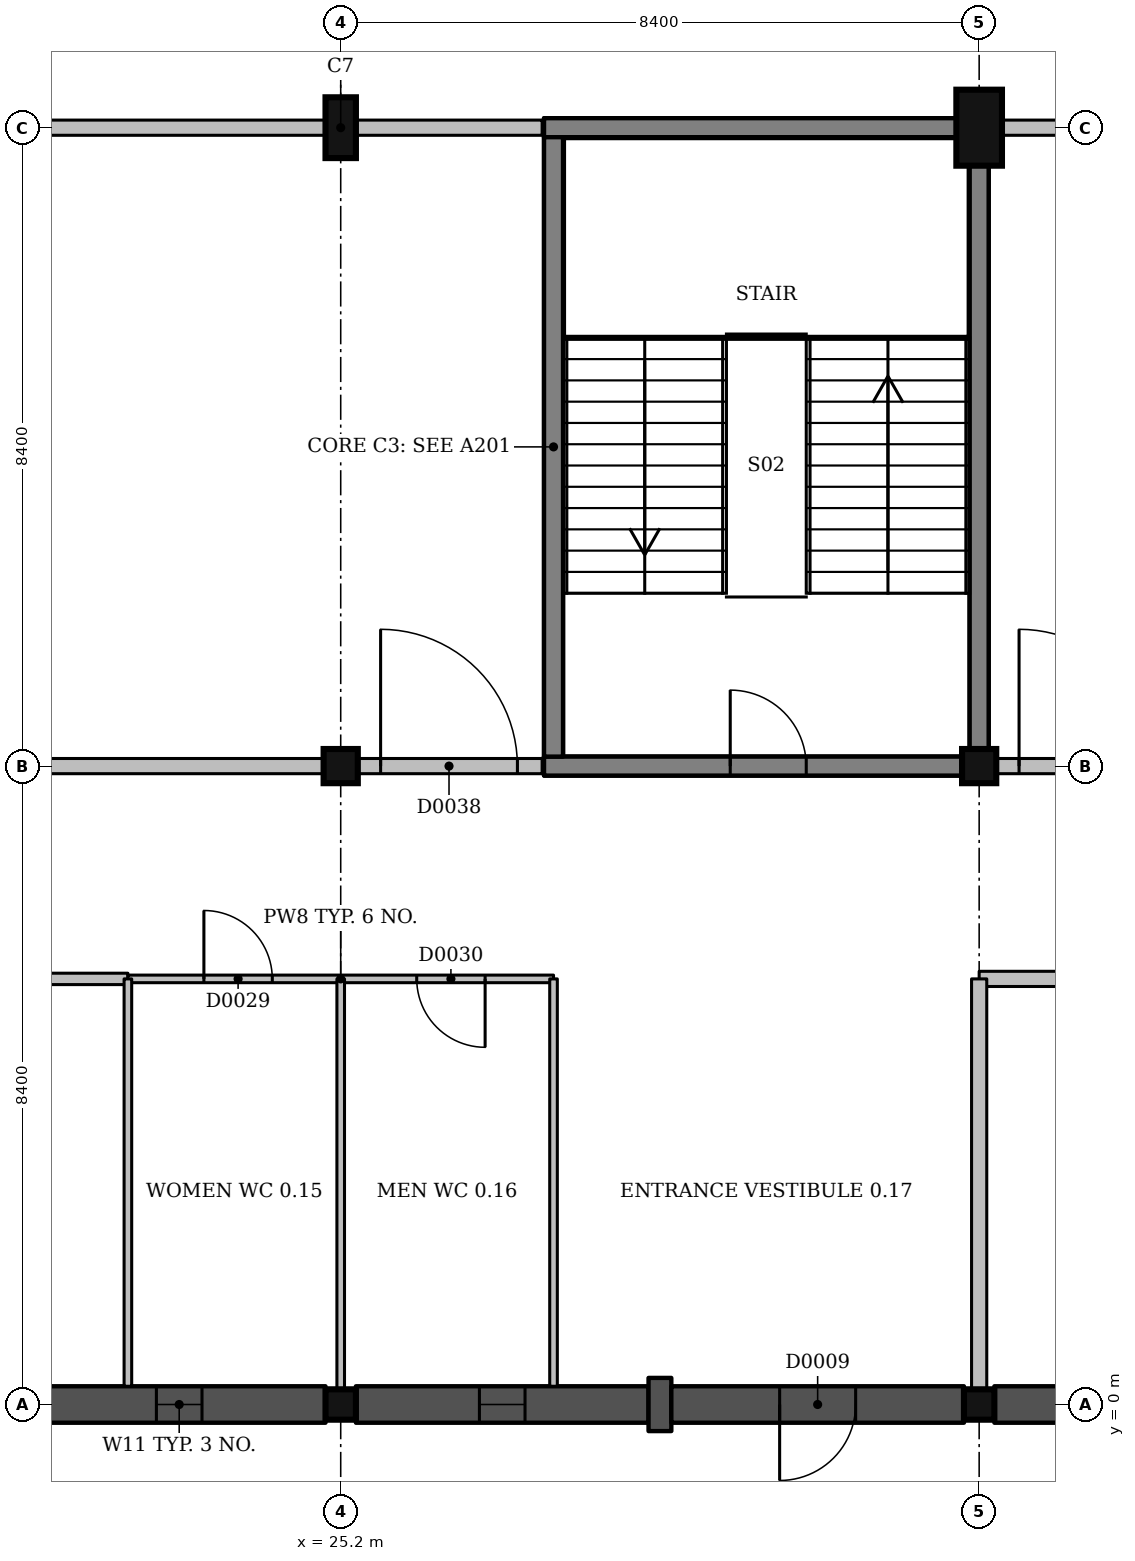
"""IFC4 building model, lengths in metres.
Left out: names, types, materials, properties, quantities, classifications, styles, units other than length and angle.
Written with IfcOpenShell. Run it as: python <this file> out.ifc"""

import sys

from ifc_helpers import new_model, si_unit, direction, frame, frame_2d, origin, origin_2d, place, context, subcontext, project, spatial, rectangle, extrude, element, fill, save


model = new_model("IFC4")
c1 = context("Model", 3, precision=1e-05, world=origin(), true_north=direction((0.0, 1.0)))
c2 = subcontext(c1, "Body", "Model", "MODEL_VIEW")
j1 = project(units=[si_unit("LENGTHUNIT", "METRE"), si_unit("PLANEANGLEUNIT", "RADIAN")], contexts=[c1])
p1 = place(None, origin())
s1 = spatial("IfcSite", under=j1, at=p1, CompositionType="ELEMENT")
p2 = place(p1, origin())
s2 = spatial("IfcBuilding", under=s1, at=p2, CompositionType="ELEMENT")
p3 = place(p2, origin())
s3 = spatial("IfcBuildingStorey", under=s2, at=p3, CompositionType="ELEMENT", Elevation=0.0)
p4 = place(p3, frame((25.2, 0.0, -1.5), z_axis=(0.0, 0.0, 1.0), x_axis=(1.0, 0.0, 0.0)))
e1 = element("IfcColumn", 1, at=p4, inside=s3, PredefinedType="COLUMN", context=c2, shape_type="SweptSolid", body=[
    extrude(rectangle(XDim=0.4, YDim=0.4, at=origin_2d()), origin(), (0.0, 0.0, 1.0), 6.0),
])
p5 = place(p3, frame((25.2, 8.4, -1.5), z_axis=(0.0, 0.0, 1.0), x_axis=(1.0, 0.0, 0.0)))
e2 = element("IfcColumn", 2, at=p5, inside=s3, PredefinedType="COLUMN", context=c2, shape_type="SweptSolid", body=[
    extrude(rectangle(XDim=0.45, YDim=0.45, at=origin_2d()), origin(), (0.0, 0.0, 1.0), 6.0),
])
p6 = place(p3, frame((25.2, 16.8, -1.5), z_axis=(0.0, 0.0, 1.0), x_axis=(1.0, 0.0, 0.0)))
e3 = element("IfcColumn", 3, at=p6, inside=s3, PredefinedType="COLUMN", context=c2, shape_type="SweptSolid", body=[
    extrude(rectangle(XDim=0.4, YDim=0.8, at=origin_2d()), origin(), (0.0, 0.0, 1.0), 6.0),
])
p7 = place(p3, frame((33.6, 0.0, -1.5), z_axis=(0.0, 0.0, 1.0), x_axis=(1.0, 0.0, 0.0)))
e4 = element("IfcColumn", 4, at=p7, inside=s3, PredefinedType="COLUMN", context=c2, shape_type="SweptSolid", body=[
    extrude(rectangle(XDim=0.4, YDim=0.4, at=origin_2d()), origin(), (0.0, 0.0, 1.0), 6.0),
])
p8 = place(p3, frame((33.6, 8.4, -1.5), z_axis=(0.0, 0.0, 1.0), x_axis=(1.0, 0.0, 0.0)))
e5 = element("IfcColumn", 5, at=p8, inside=s3, PredefinedType="COLUMN", context=c2, shape_type="SweptSolid", body=[
    extrude(rectangle(XDim=0.45, YDim=0.45, at=origin_2d()), origin(), (0.0, 0.0, 1.0), 6.0),
])
p9 = place(p3, frame((33.6, 16.8, -1.5), z_axis=(0.0, 0.0, 1.0), x_axis=(1.0, 0.0, 0.0)))
e6 = element("IfcColumn", 6, at=p9, inside=s3, PredefinedType="COLUMN", context=c2, shape_type="SweptSolid", body=[
    extrude(rectangle(XDim=0.6, YDim=1.0, at=origin_2d()), origin(), (0.0, 0.0, 1.0), 6.0),
])
p10 = place(p3, frame((27.875, 8.4, 0.0), z_axis=(0.0, 0.0, 1.0), x_axis=(1.0, 0.0, 0.0)))
e7 = element("IfcWall", 7, at=p10, inside=s3, PredefinedType="SHEAR", context=c2, shape_type="SweptSolid", body=[
    extrude(rectangle(XDim=5.5, YDim=0.25, at=frame_2d((2.75, 0.0))), origin(), (0.0, 0.0, 1.0), 4.5),
])
p11 = place(p10, frame((2.45, 0.0, 0.0)))
e8 = element("IfcOpeningElement", 8, at=p11, cuts=e7, PredefinedType="OPENING", context=c2, shape_type="SweptSolid", body=[
    extrude(rectangle(XDim=1.0, YDim=2.1, at=frame_2d((0.5, 1.05))), frame((0.0, 0.135, 0.0), z_axis=(0.0, -1.0, 0.0), x_axis=(1.0, 0.0, 0.0)), (0.0, 0.0, 1.0), 0.27),
])
p12 = place(p3, frame((27.875, 16.8, 0.0), z_axis=(0.0, 0.0, 1.0), x_axis=(1.0, 0.0, 0.0)))
e9 = element("IfcWall", 9, at=p12, inside=s3, PredefinedType="SHEAR", context=c2, shape_type="SweptSolid", body=[
    extrude(rectangle(XDim=5.425, YDim=0.25, at=frame_2d((2.712, 0.0))), origin(), (0.0, 0.0, 1.0), 4.5),
])
p13 = place(p3, frame((28.0, 8.525, 0.0), z_axis=(0.0, 0.0, 1.0), x_axis=(0.0, 1.0, 0.0)))
e10 = element("IfcWall", 10, at=p13, inside=s3, PredefinedType="SHEAR", context=c2, shape_type="SweptSolid", body=[
    extrude(rectangle(XDim=8.15, YDim=0.25, at=frame_2d((4.075, 0.0))), origin(), (0.0, 0.0, 1.0), 4.5),
])
p14 = place(p3, frame((33.6, 8.625, 0.0), z_axis=(0.0, 0.0, 1.0), x_axis=(0.0, 1.0, 0.0)))
e11 = element("IfcWall", 11, at=p14, inside=s3, PredefinedType="SHEAR", context=c2, shape_type="SweptSolid", body=[
    extrude(rectangle(XDim=7.675, YDim=0.25, at=frame_2d((3.837, 0.0))), origin(), (0.0, 0.0, 1.0), 4.5),
])
for number, where, z_axis, x_axis in (
    (12, (27.875, 8.4, -1.5), (0.0, 0.0, 1.0), (1.0, 0.0, 0.0)),
    (13, (27.875, 16.8, -1.5), (0.0, 0.0, 1.0), (1.0, 0.0, 0.0)),
):
    element("IfcWall", number, at=place(p3, frame(where, z_axis=z_axis, x_axis=x_axis)), inside=s3, PredefinedType="SHEAR", context=c2, shape_type="SweptSolid", body=[
        extrude(rectangle(XDim=5.85, YDim=0.25, at=frame_2d((2.925, 0.0))), origin(), (0.0, 0.0, 1.0), 1.5),
    ])
for number, where, z_axis, x_axis in (
    (14, (28.0, 8.525, -1.5), (0.0, 0.0, 1.0), (0.0, 1.0, 0.0)),
    (15, (33.6, 8.525, -1.5), (0.0, 0.0, 1.0), (0.0, 1.0, 0.0)),
):
    element("IfcWall", number, at=place(p3, frame(where, z_axis=z_axis, x_axis=x_axis)), inside=s3, PredefinedType="SHEAR", context=c2, shape_type="SweptSolid", body=[
        extrude(rectangle(XDim=8.15, YDim=0.25, at=frame_2d((4.075, 0.0))), origin(), (0.0, 0.0, 1.0), 1.5),
    ])
p15 = place(p3, frame((21.15, 0.0, 0.0), z_axis=(0.0, 0.0, 1.0), x_axis=(1.0, 0.0, 0.0)))
e16 = element("IfcWall", 16, at=p15, inside=s3, PredefinedType="SOLIDWALL", context=c2, shape_type="SweptSolid", body=[
    extrude(rectangle(XDim=3.85, YDim=0.48, at=frame_2d((1.925, 0.0))), origin(), (0.0, 0.0, 1.0), 3.45),
])
p16 = place(p15, frame((1.625, 0.0, 1.5)))
e17 = element("IfcOpeningElement", 17, at=p16, cuts=e16, PredefinedType="OPENING", context=c2, shape_type="SweptSolid", body=[
    extrude(rectangle(XDim=0.6, YDim=1.2, at=frame_2d((0.3, 0.6))), frame((0.0, 0.25, 0.0), z_axis=(0.0, -1.0, 0.0), x_axis=(1.0, 0.0, 0.0)), (0.0, 0.0, 1.0), 0.5),
])
p17 = place(p3, frame((25.4, 0.0, 0.0), z_axis=(0.0, 0.0, 1.0), x_axis=(1.0, 0.0, 0.0)))
e18 = element("IfcWall", 18, at=p17, inside=s3, PredefinedType="SOLIDWALL", context=c2, shape_type="SweptSolid", body=[
    extrude(rectangle(XDim=3.85, YDim=0.48, at=frame_2d((1.925, 0.0))), origin(), (0.0, 0.0, 1.0), 3.45),
])
p18 = place(p17, frame((1.625, 0.0, 1.5)))
e19 = element("IfcOpeningElement", 19, at=p18, cuts=e18, PredefinedType="OPENING", context=c2, shape_type="SweptSolid", body=[
    extrude(rectangle(XDim=0.6, YDim=1.2, at=frame_2d((0.3, 0.6))), frame((0.0, 0.25, 0.0), z_axis=(0.0, -1.0, 0.0), x_axis=(1.0, 0.0, 0.0)), (0.0, 0.0, 1.0), 0.5),
])
p19 = place(p3, frame((29.25, 0.0, 0.0), z_axis=(0.0, 0.0, 1.0), x_axis=(1.0, 0.0, 0.0)))
e20 = element("IfcWall", 20, at=p19, inside=s3, PredefinedType="SOLIDWALL", context=c2, shape_type="SweptSolid", body=[
    extrude(rectangle(XDim=0.3, YDim=0.7, at=frame_2d((0.15, 0.0))), origin(), (0.0, 0.0, 1.0), 3.45),
])
p20 = place(p3, frame((29.55, 0.0, 0.0), z_axis=(0.0, 0.0, 1.0), x_axis=(1.0, 0.0, 0.0)))
e21 = element("IfcWall", 21, at=p20, inside=s3, PredefinedType="SOLIDWALL", context=c2, shape_type="SweptSolid", body=[
    extrude(rectangle(XDim=3.85, YDim=0.48, at=frame_2d((1.925, 0.0))), origin(), (0.0, 0.0, 1.0), 3.45),
])
p21 = place(p20, frame((1.425, 0.0, 0.0)))
e22 = element("IfcOpeningElement", 22, at=p21, cuts=e21, PredefinedType="OPENING", context=c2, shape_type="SweptSolid", body=[
    extrude(rectangle(XDim=1.0, YDim=2.1, at=frame_2d((0.5, 1.05))), frame((0.0, 0.25, 0.0), z_axis=(0.0, -1.0, 0.0), x_axis=(1.0, 0.0, 0.0)), (0.0, 0.0, 1.0), 0.5),
])
p22 = place(p3, frame((33.8, 0.0, 0.0), z_axis=(0.0, 0.0, 1.0), x_axis=(1.0, 0.0, 0.0)))
e23 = element("IfcWall", 23, at=p22, inside=s3, PredefinedType="SOLIDWALL", context=c2, shape_type="SweptSolid", body=[
    extrude(rectangle(XDim=3.85, YDim=0.48, at=frame_2d((1.925, 0.0))), origin(), (0.0, 0.0, 1.0), 3.45),
])
p23 = place(p22, frame((1.175, 0.0, 0.0)))
e24 = element("IfcOpeningElement", 24, at=p23, cuts=e23, PredefinedType="OPENING", context=c2, shape_type="SweptSolid", body=[
    extrude(rectangle(XDim=1.5, YDim=2.1, at=frame_2d((0.75, 1.05))), frame((0.0, 0.25, 0.0), z_axis=(0.0, -1.0, 0.0), x_axis=(1.0, 0.0, 0.0)), (0.0, 0.0, 1.0), 0.5),
])
p24 = place(p3, frame((5.6, 5.6, 0.0), z_axis=(0.0, 0.0, 1.0), x_axis=(1.0, 0.0, 0.0)))
e25 = element("IfcWall", 25, at=p24, inside=s3, PredefinedType="PARTITIONING", context=c2, shape_type="SweptSolid", body=[
    extrude(rectangle(XDim=16.8, YDim=0.15, at=frame_2d((8.4, 0.0))), origin(), (0.0, 0.0, 1.0), 3.5),
])
p25 = place(p24, frame((3.8, 0.0, 0.0)))
e26 = element("IfcOpeningElement", 26, at=p25, cuts=e25, PredefinedType="OPENING", context=c2, shape_type="SweptSolid", body=[
    extrude(rectangle(XDim=0.9, YDim=2.1, at=frame_2d((0.45, 1.05))), frame((0.0, 0.085, 0.0), z_axis=(0.0, -1.0, 0.0), x_axis=(1.0, 0.0, 0.0)), (0.0, 0.0, 1.0), 0.17),
])
p26 = place(p24, frame((12.2, 0.0, 0.0)))
e27 = element("IfcOpeningElement", 27, at=p26, cuts=e25, PredefinedType="OPENING", context=c2, shape_type="SweptSolid", body=[
    extrude(rectangle(XDim=0.9, YDim=2.1, at=frame_2d((0.45, 1.05))), frame((0.0, 0.085, 0.0), z_axis=(0.0, -1.0, 0.0), x_axis=(1.0, 0.0, 0.0)), (0.0, 0.0, 1.0), 0.17),
])
p27 = place(p3, frame((22.4, 5.6, 0.0), z_axis=(0.0, 0.0, 1.0), x_axis=(1.0, 0.0, 0.0)))
e28 = element("IfcWall", 28, at=p27, inside=s3, PredefinedType="PARTITIONING", context=c2, shape_type="SweptSolid", body=[
    extrude(rectangle(XDim=5.6, YDim=0.1, at=frame_2d((2.8, 0.0))), origin(), (0.0, 0.0, 1.0), 3.5),
])
p28 = place(p27, frame((1.0, 0.0, 0.0)))
e29 = element("IfcOpeningElement", 29, at=p28, cuts=e28, PredefinedType="OPENING", context=c2, shape_type="SweptSolid", body=[
    extrude(rectangle(XDim=0.9, YDim=2.1, at=frame_2d((0.45, 1.05))), frame((0.0, 0.06, 0.0), z_axis=(0.0, -1.0, 0.0), x_axis=(1.0, 0.0, 0.0)), (0.0, 0.0, 1.0), 0.12),
])
p29 = place(p27, frame((3.8, 0.0, 0.0)))
e30 = element("IfcOpeningElement", 30, at=p29, cuts=e28, PredefinedType="OPENING", context=c2, shape_type="SweptSolid", body=[
    extrude(rectangle(XDim=0.9, YDim=2.1, at=frame_2d((0.45, 1.05))), frame((0.0, 0.06, 0.0), z_axis=(0.0, -1.0, 0.0), x_axis=(1.0, 0.0, 0.0)), (0.0, 0.0, 1.0), 0.12),
])
p30 = place(p3, frame((33.6, 5.6, 0.0), z_axis=(0.0, 0.0, 1.0), x_axis=(1.0, 0.0, 0.0)))
e31 = element("IfcWall", 31, at=p30, inside=s3, PredefinedType="PARTITIONING", context=c2, shape_type="SweptSolid", body=[
    extrude(rectangle(XDim=25.2, YDim=0.2, at=frame_2d((12.6, 0.0))), origin(), (0.0, 0.0, 1.0), 3.5),
])
p31 = place(p30, frame((12.2, 0.0, 0.0)))
e32 = element("IfcOpeningElement", 32, at=p31, cuts=e31, PredefinedType="OPENING", context=c2, shape_type="SweptSolid", body=[
    extrude(rectangle(XDim=1.0, YDim=2.1, at=frame_2d((0.5, 1.05))), frame((0.0, 0.11, 0.0), z_axis=(0.0, -1.0, 0.0), x_axis=(1.0, 0.0, 0.0)), (0.0, 0.0, 1.0), 0.22),
])
p32 = place(p3, frame((17.025, 8.4, 0.0), z_axis=(0.0, 0.0, 1.0), x_axis=(1.0, 0.0, 0.0)))
e33 = element("IfcWall", 33, at=p32, inside=s3, PredefinedType="PARTITIONING", context=c2, shape_type="SweptSolid", body=[
    extrude(rectangle(XDim=7.95, YDim=0.2, at=frame_2d((3.975, 0.0))), origin(), (0.0, 0.0, 1.0), 3.5),
])
p33 = place(p3, frame((25.425, 8.4, 0.0), z_axis=(0.0, 0.0, 1.0), x_axis=(1.0, 0.0, 0.0)))
e34 = element("IfcWall", 34, at=p33, inside=s3, PredefinedType="PARTITIONING", context=c2, shape_type="SweptSolid", body=[
    extrude(rectangle(XDim=2.425, YDim=0.2, at=frame_2d((1.212, 0.0))), origin(), (0.0, 0.0, 1.0), 3.6),
])
p34 = place(p33, frame((0.3, 0.0, 0.0)))
e35 = element("IfcOpeningElement", 35, at=p34, cuts=e34, PredefinedType="OPENING", context=c2, shape_type="SweptSolid", body=[
    extrude(rectangle(XDim=1.8, YDim=2.1, at=frame_2d((0.9, 1.05))), frame((0.0, 0.11, 0.0), z_axis=(0.0, -1.0, 0.0), x_axis=(1.0, 0.0, 0.0)), (0.0, 0.0, 1.0), 0.22),
])
p35 = place(p3, frame((33.825, 8.4, 0.0), z_axis=(0.0, 0.0, 1.0), x_axis=(1.0, 0.0, 0.0)))
e36 = element("IfcWall", 36, at=p35, inside=s3, PredefinedType="PARTITIONING", context=c2, shape_type="SweptSolid", body=[
    extrude(rectangle(XDim=7.95, YDim=0.2, at=frame_2d((3.975, 0.0))), origin(), (0.0, 0.0, 1.0), 3.5),
])
p36 = place(p35, frame((0.3, 0.0, 0.0)))
e37 = element("IfcOpeningElement", 37, at=p36, cuts=e36, PredefinedType="OPENING", context=c2, shape_type="SweptSolid", body=[
    extrude(rectangle(XDim=1.8, YDim=2.1, at=frame_2d((0.9, 1.05))), frame((0.0, 0.11, 0.0), z_axis=(0.0, -1.0, 0.0), x_axis=(1.0, 0.0, 0.0)), (0.0, 0.0, 1.0), 0.22),
])
p37 = place(p3, frame((17.1, 16.8, 0.0), z_axis=(0.0, 0.0, 1.0), x_axis=(1.0, 0.0, 0.0)))
e38 = element("IfcWall", 38, at=p37, inside=s3, PredefinedType="PARTITIONING", context=c2, shape_type="SweptSolid", body=[
    extrude(rectangle(XDim=7.9, YDim=0.2, at=frame_2d((3.95, 0.0))), origin(), (0.0, 0.0, 1.0), 3.45),
])
p38 = place(p3, frame((25.4, 16.8, 0.0), z_axis=(0.0, 0.0, 1.0), x_axis=(1.0, 0.0, 0.0)))
e39 = element("IfcWall", 39, at=p38, inside=s3, PredefinedType="PARTITIONING", context=c2, shape_type="SweptSolid", body=[
    extrude(rectangle(XDim=2.45, YDim=0.2, at=frame_2d((1.225, 0.0))), origin(), (0.0, 0.0, 1.0), 3.45),
])
p39 = place(p3, frame((33.9, 16.8, 0.0), z_axis=(0.0, 0.0, 1.0), x_axis=(1.0, 0.0, 0.0)))
e40 = element("IfcWall", 40, at=p39, inside=s3, PredefinedType="PARTITIONING", context=c2, shape_type="SweptSolid", body=[
    extrude(rectangle(XDim=7.9, YDim=0.2, at=frame_2d((3.95, 0.0))), origin(), (0.0, 0.0, 1.0), 3.45),
])
p40 = place(p3, frame((22.4, 0.24, 0.0), z_axis=(0.0, 0.0, 1.0), x_axis=(0.0, 1.0, 0.0)))
e41 = element("IfcWall", 41, at=p40, inside=s3, PredefinedType="PARTITIONING", context=c2, shape_type="SweptSolid", body=[
    extrude(rectangle(XDim=5.36, YDim=0.1, at=frame_2d((2.68, 0.0))), origin(), (0.0, 0.0, 1.0), 4.15),
])
p41 = place(p3, frame((25.2, 0.2, 0.0), z_axis=(0.0, 0.0, 1.0), x_axis=(0.0, 1.0, 0.0)))
e42 = element("IfcWall", 42, at=p41, inside=s3, PredefinedType="PARTITIONING", context=c2, shape_type="SweptSolid", body=[
    extrude(rectangle(XDim=5.4, YDim=0.1, at=frame_2d((2.7, 0.0))), origin(), (0.0, 0.0, 1.0), 3.5),
])
p42 = place(p3, frame((28.0, 0.24, 0.0), z_axis=(0.0, 0.0, 1.0), x_axis=(0.0, 1.0, 0.0)))
e43 = element("IfcWall", 43, at=p42, inside=s3, PredefinedType="PARTITIONING", context=c2, shape_type="SweptSolid", body=[
    extrude(rectangle(XDim=5.36, YDim=0.1, at=frame_2d((2.68, 0.0))), origin(), (0.0, 0.0, 1.0), 4.15),
])
p43 = place(p3, frame((33.6, 0.2, 0.0), z_axis=(0.0, 0.0, 1.0), x_axis=(0.0, 1.0, 0.0)))
e44 = element("IfcWall", 44, at=p43, inside=s3, PredefinedType="PARTITIONING", context=c2, shape_type="SweptSolid", body=[
    extrude(rectangle(XDim=5.4, YDim=0.2, at=frame_2d((2.7, 0.0))), origin(), (0.0, 0.0, 1.0), 3.5),
])
p44 = place(p16, origin())
e45 = element("IfcWindow", 45, at=p44, inside=s3, PartitioningType="SINGLE_PANEL", PredefinedType="WINDOW", context=c2, shape_type="SweptSolid", body=[
    extrude(rectangle(XDim=0.6, YDim=1.2, at=frame_2d((0.3, 0.6))), frame((0.0, 0.12, 0.0), z_axis=(0.0, -1.0, 0.0), x_axis=(1.0, 0.0, 0.0)), (0.0, 0.0, 1.0), 0.06),
])
fill(e17, e45)
p45 = place(p18, origin())
e46 = element("IfcWindow", 46, at=p45, inside=s3, PartitioningType="SINGLE_PANEL", PredefinedType="WINDOW", context=c2, shape_type="SweptSolid", body=[
    extrude(rectangle(XDim=0.6, YDim=1.2, at=frame_2d((0.3, 0.6))), frame((0.0, 0.12, 0.0), z_axis=(0.0, -1.0, 0.0), x_axis=(1.0, 0.0, 0.0)), (0.0, 0.0, 1.0), 0.06),
])
fill(e19, e46)
p46 = place(p21, origin())
e47 = element("IfcDoor", 47, at=p46, inside=s3, OperationType="SINGLE_SWING_LEFT", PredefinedType="DOOR", context=c2, shape_type="SweptSolid", body=[
    extrude(rectangle(XDim=1.0, YDim=2.1, at=frame_2d((0.5, 1.05))), frame((0.0, 0.025, 0.0), z_axis=(0.0, -1.0, 0.0), x_axis=(1.0, 0.0, 0.0)), (0.0, 0.0, 1.0), 0.05),
])
fill(e22, e47)
p47 = place(p28, origin())
e48 = element("IfcDoor", 48, at=p47, inside=s3, OperationType="SINGLE_SWING_LEFT", PredefinedType="DOOR", context=c2, shape_type="SweptSolid", body=[
    extrude(rectangle(XDim=0.9, YDim=2.1, at=frame_2d((0.45, 1.05))), frame((0.0, 0.025, 0.0), z_axis=(0.0, -1.0, 0.0), x_axis=(1.0, 0.0, 0.0)), (0.0, 0.0, 1.0), 0.05),
])
fill(e29, e48)
p48 = place(p29, origin())
e49 = element("IfcDoor", 49, at=p48, inside=s3, OperationType="SINGLE_SWING_RIGHT", PredefinedType="DOOR", context=c2, shape_type="SweptSolid", body=[
    extrude(rectangle(XDim=0.9, YDim=2.1, at=frame_2d((0.45, 1.05))), frame((0.0, 0.025, 0.0), z_axis=(0.0, -1.0, 0.0), x_axis=(1.0, 0.0, 0.0)), (0.0, 0.0, 1.0), 0.05),
])
fill(e30, e49)
p49 = place(p34, origin())
e50 = element("IfcDoor", 50, at=p49, inside=s3, OperationType="DOUBLE_DOOR_SINGLE_SWING", PredefinedType="DOOR", context=c2, shape_type="SweptSolid", body=[
    extrude(rectangle(XDim=1.8, YDim=2.1, at=frame_2d((0.9, 1.05))), frame((0.0, 0.025, 0.0), z_axis=(0.0, -1.0, 0.0), x_axis=(1.0, 0.0, 0.0)), (0.0, 0.0, 1.0), 0.05),
])
fill(e35, e50)
p50 = place(p36, origin())
e51 = element("IfcDoor", 51, at=p50, inside=s3, OperationType="DOUBLE_DOOR_SINGLE_SWING", PredefinedType="DOOR", context=c2, shape_type="SweptSolid", body=[
    extrude(rectangle(XDim=1.8, YDim=2.1, at=frame_2d((0.9, 1.05))), frame((0.0, 0.025, 0.0), z_axis=(0.0, -1.0, 0.0), x_axis=(1.0, 0.0, 0.0)), (0.0, 0.0, 1.0), 0.05),
])
fill(e37, e51)
p51 = place(p11, origin())
e52 = element("IfcDoor", 52, at=p51, inside=s3, OperationType="SINGLE_SWING_LEFT", PredefinedType="DOOR", context=c2, shape_type="SweptSolid", body=[
    extrude(rectangle(XDim=1.0, YDim=2.1, at=frame_2d((0.5, 1.05))), frame((0.0, 0.025, 0.0), z_axis=(0.0, -1.0, 0.0), x_axis=(1.0, 0.0, 0.0)), (0.0, 0.0, 1.0), 0.05),
])
fill(e8, e52)
save(model, sys.argv[1])
